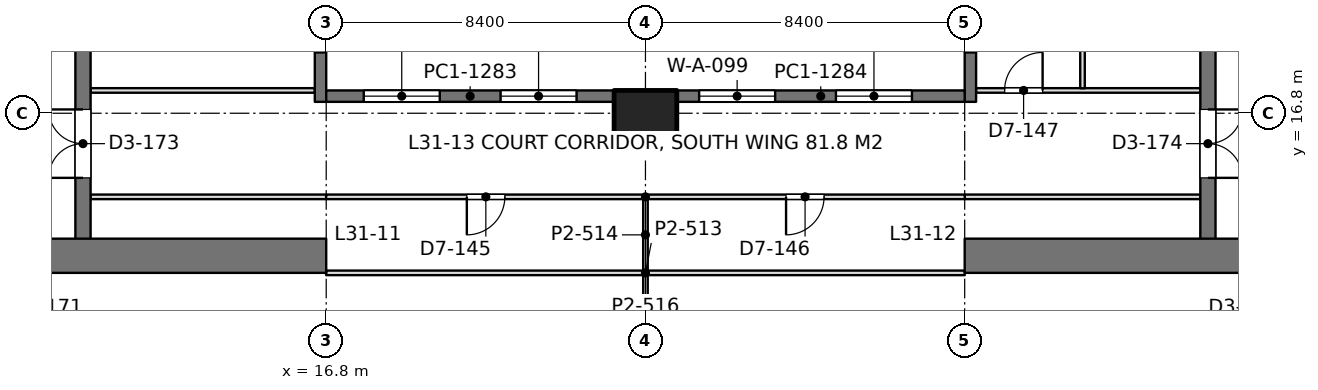
"""IFC4 building model, lengths in metres.
Left out: names, types, materials, properties, quantities, classifications, styles, units other than length and angle.
Written with IfcOpenShell. Run it as: python <this file> out.ifc"""

import sys

from ifc_helpers import new_model, si_unit, direction, frame, frame_2d, origin, origin_2d, place, context, subcontext, project, spatial, rectangle, extrude, element, fill, save


model = new_model("IFC4")
c1 = context("Model", 3, precision=1e-05, world=origin(), true_north=direction((0.0, 1.0)))
c2 = subcontext(c1, "Body", "Model", "MODEL_VIEW")
j1 = project(units=[si_unit("LENGTHUNIT", "METRE"), si_unit("PLANEANGLEUNIT", "RADIAN")], contexts=[c1])
p1 = place(None, origin())
s1 = spatial("IfcSite", under=j1, at=p1, CompositionType="ELEMENT")
p2 = place(p1, origin())
s2 = spatial("IfcBuilding", under=s1, at=p2, CompositionType="ELEMENT")
p3 = place(p2, frame((0.0, 0.0, 138.6)))
s3 = spatial("IfcBuildingStorey", under=s2, at=p3, CompositionType="ELEMENT", Elevation=138.6)
p4 = place(p3, frame((25.2, 16.8, 0.0), z_axis=(0.0, 0.0, 1.0), x_axis=(1.0, 0.0, 0.0)))
e1 = element("IfcColumn", 1, at=p4, inside=s3, PredefinedType="COLUMN", context=c2, shape_type="SweptSolid", body=[
    extrude(rectangle(XDim=1.65, YDim=1.2, at=origin_2d()), origin(), (0.0, 0.0, 1.0), 4.2),
])
p5 = place(p3, frame((-1.2, 13.05, 0.0), z_axis=(0.0, 0.0, 1.0), x_axis=(1.0, 0.0, 0.0)))
e2 = element("IfcWall", 2, at=p5, inside=s3, PredefinedType="SHEAR", context=c2, shape_type="SweptSolid", body=[
    extrude(rectangle(XDim=18.0, YDim=0.9, at=frame_2d((9.0, 0.0))), origin(), (0.0, 0.0, 1.0), 4.2),
])
p6 = place(p5, frame((8.95, 0.0, 0.0)))
e3 = element("IfcOpeningElement", 3, at=p6, cuts=e2, PredefinedType="OPENING", context=c2, shape_type="SweptSolid", body=[
    extrude(rectangle(XDim=1.8, YDim=2.4, at=frame_2d((0.9, 1.2))), frame((0.0, 0.46, 0.0), z_axis=(0.0, -1.0, 0.0), x_axis=(1.0, 0.0, 0.0)), (0.0, 0.0, 1.0), 0.92),
])
p7 = place(p3, frame((10.4, 13.05, 0.0), z_axis=(0.0, 0.0, 1.0), x_axis=(0.0, 1.0, 0.0)))
e4 = element("IfcWall", 4, at=p7, inside=s3, PredefinedType="SHEAR", context=c2, shape_type="SweptSolid", body=[
    extrude(rectangle(XDim=24.3, YDim=0.4, at=frame_2d((12.15, 0.0))), origin(), (0.0, 0.0, 1.0), 4.2),
])
p8 = place(p7, frame((10.05, 0.0, 0.0)))
e5 = element("IfcOpeningElement", 5, at=p8, cuts=e4, PredefinedType="OPENING", context=c2, shape_type="SweptSolid", body=[
    extrude(rectangle(XDim=1.1, YDim=2.2, at=frame_2d((0.55, 1.1))), frame((0.0, 0.21, 0.0), z_axis=(0.0, -1.0, 0.0), x_axis=(1.0, 0.0, 0.0)), (0.0, 0.0, 1.0), 0.42),
])
p9 = place(p7, frame((12.9, 0.0, 0.0)))
e6 = element("IfcOpeningElement", 6, at=p9, cuts=e4, PredefinedType="OPENING", context=c2, shape_type="SweptSolid", body=[
    extrude(rectangle(XDim=1.1, YDim=2.2, at=frame_2d((0.55, 1.1))), frame((0.0, 0.21, 0.0), z_axis=(0.0, -1.0, 0.0), x_axis=(1.0, 0.0, 0.0)), (0.0, 0.0, 1.0), 0.42),
])
p10 = place(p7, frame((21.45, 0.0, 0.0)))
e7 = element("IfcOpeningElement", 7, at=p10, cuts=e4, PredefinedType="OPENING", context=c2, shape_type="SweptSolid", body=[
    extrude(rectangle(XDim=1.1, YDim=2.2, at=frame_2d((0.55, 1.1))), frame((0.0, 0.21, 0.0), z_axis=(0.0, -1.0, 0.0), x_axis=(1.0, 0.0, 0.0)), (0.0, 0.0, 1.0), 0.42),
])
p11 = place(p7, frame((2.05, 0.0, 0.0)))
e8 = element("IfcOpeningElement", 8, at=p11, cuts=e4, PredefinedType="OPENING", context=c2, shape_type="SweptSolid", body=[
    extrude(rectangle(XDim=1.8, YDim=2.4, at=frame_2d((0.9, 1.2))), frame((0.0, 0.21, 0.0), z_axis=(0.0, -1.0, 0.0), x_axis=(1.0, 0.0, 0.0)), (0.0, 0.0, 1.0), 0.42),
])
p12 = place(p7, frame((5.8, 0.0, 0.0)))
e9 = element("IfcOpeningElement", 9, at=p12, cuts=e4, PredefinedType="OPENING", context=c2, shape_type="SweptSolid", body=[
    extrude(rectangle(XDim=1.8, YDim=2.4, at=frame_2d((0.9, 1.2))), frame((0.0, 0.21, 0.0), z_axis=(0.0, -1.0, 0.0), x_axis=(1.0, 0.0, 0.0)), (0.0, 0.0, 1.0), 0.42),
])
p13 = place(p3, frame((33.6, 13.05, 0.0), z_axis=(0.0, 0.0, 1.0), x_axis=(1.0, 0.0, 0.0)))
e10 = element("IfcWall", 10, at=p13, inside=s3, PredefinedType="SHEAR", context=c2, shape_type="SweptSolid", body=[
    extrude(rectangle(XDim=18.0, YDim=0.9, at=frame_2d((9.0, 0.0))), origin(), (0.0, 0.0, 1.0), 4.2),
])
p14 = place(p13, frame((7.25, 0.0, 0.0)))
e11 = element("IfcOpeningElement", 11, at=p14, cuts=e10, PredefinedType="OPENING", context=c2, shape_type="SweptSolid", body=[
    extrude(rectangle(XDim=1.8, YDim=2.4, at=frame_2d((0.9, 1.2))), frame((0.0, 0.46, 0.0), z_axis=(0.0, -1.0, 0.0), x_axis=(1.0, 0.0, 0.0)), (0.0, 0.0, 1.0), 0.92),
])
p15 = place(p3, frame((40.0, 13.05, 0.0), z_axis=(0.0, 0.0, 1.0), x_axis=(0.0, 1.0, 0.0)))
e12 = element("IfcWall", 12, at=p15, inside=s3, PredefinedType="SHEAR", context=c2, shape_type="SweptSolid", body=[
    extrude(rectangle(XDim=24.3, YDim=0.4, at=frame_2d((12.15, 0.0))), origin(), (0.0, 0.0, 1.0), 4.2),
])
p16 = place(p15, frame((10.05, 0.0, 0.0)))
e13 = element("IfcOpeningElement", 13, at=p16, cuts=e12, PredefinedType="OPENING", context=c2, shape_type="SweptSolid", body=[
    extrude(rectangle(XDim=1.1, YDim=2.2, at=frame_2d((0.55, 1.1))), frame((0.0, 0.21, 0.0), z_axis=(0.0, -1.0, 0.0), x_axis=(1.0, 0.0, 0.0)), (0.0, 0.0, 1.0), 0.42),
])
p17 = place(p15, frame((12.9, 0.0, 0.0)))
e14 = element("IfcOpeningElement", 14, at=p17, cuts=e12, PredefinedType="OPENING", context=c2, shape_type="SweptSolid", body=[
    extrude(rectangle(XDim=1.1, YDim=2.2, at=frame_2d((0.55, 1.1))), frame((0.0, 0.21, 0.0), z_axis=(0.0, -1.0, 0.0), x_axis=(1.0, 0.0, 0.0)), (0.0, 0.0, 1.0), 0.42),
])
p18 = place(p15, frame((21.45, 0.0, 0.0)))
e15 = element("IfcOpeningElement", 15, at=p18, cuts=e12, PredefinedType="OPENING", context=c2, shape_type="SweptSolid", body=[
    extrude(rectangle(XDim=1.1, YDim=2.2, at=frame_2d((0.55, 1.1))), frame((0.0, 0.21, 0.0), z_axis=(0.0, -1.0, 0.0), x_axis=(1.0, 0.0, 0.0)), (0.0, 0.0, 1.0), 0.42),
])
p19 = place(p15, frame((2.05, 0.0, 0.0)))
e16 = element("IfcOpeningElement", 16, at=p19, cuts=e12, PredefinedType="OPENING", context=c2, shape_type="SweptSolid", body=[
    extrude(rectangle(XDim=1.8, YDim=2.4, at=frame_2d((0.9, 1.2))), frame((0.0, 0.21, 0.0), z_axis=(0.0, -1.0, 0.0), x_axis=(1.0, 0.0, 0.0)), (0.0, 0.0, 1.0), 0.42),
])
p20 = place(p15, frame((5.8, 0.0, 0.0)))
e17 = element("IfcOpeningElement", 17, at=p20, cuts=e12, PredefinedType="OPENING", context=c2, shape_type="SweptSolid", body=[
    extrude(rectangle(XDim=1.8, YDim=2.4, at=frame_2d((0.9, 1.2))), frame((0.0, 0.21, 0.0), z_axis=(0.0, -1.0, 0.0), x_axis=(1.0, 0.0, 0.0)), (0.0, 0.0, 1.0), 0.42),
])
p21 = place(p3, frame((16.65, 17.1, 0.0), z_axis=(0.0, 0.0, 1.0), x_axis=(0.0, 1.0, 0.0)))
e18 = element("IfcWall", 18, at=p21, inside=s3, PredefinedType="SOLIDWALL", context=c2, shape_type="SweptSolid", body=[
    extrude(rectangle(XDim=5.0, YDim=0.3, at=frame_2d((2.5, 0.0))), origin(), (0.0, 0.0, 1.0), 4.05),
])
p22 = place(p21, frame((1.3, 0.0, 0.1)))
e19 = element("IfcOpeningElement", 19, at=p22, cuts=e18, PredefinedType="OPENING", context=c2, shape_type="SweptSolid", body=[
    extrude(rectangle(XDim=2.0, YDim=3.0, at=frame_2d((1.0, 1.5))), frame((0.0, 0.16, 0.0), z_axis=(0.0, -1.0, 0.0), x_axis=(1.0, 0.0, 0.0)), (0.0, 0.0, 1.0), 0.32),
])
p23 = place(p3, frame((33.75, 17.1, 0.0), z_axis=(0.0, 0.0, 1.0), x_axis=(0.0, 1.0, 0.0)))
e20 = element("IfcWall", 20, at=p23, inside=s3, PredefinedType="SOLIDWALL", context=c2, shape_type="SweptSolid", body=[
    extrude(rectangle(XDim=5.0, YDim=0.3, at=frame_2d((2.5, 0.0))), origin(), (0.0, 0.0, 1.0), 4.05),
])
p24 = place(p23, frame((1.3, 0.0, 0.1)))
e21 = element("IfcOpeningElement", 21, at=p24, cuts=e20, PredefinedType="OPENING", context=c2, shape_type="SweptSolid", body=[
    extrude(rectangle(XDim=2.0, YDim=3.0, at=frame_2d((1.0, 1.5))), frame((0.0, 0.16, 0.0), z_axis=(0.0, -1.0, 0.0), x_axis=(1.0, 0.0, 0.0)), (0.0, 0.0, 1.0), 0.32),
])
p25 = place(p3, frame((16.8, 17.25, 0.0), z_axis=(0.0, 0.0, 1.0), x_axis=(1.0, 0.0, 0.0)))
e22 = element("IfcWall", 22, at=p25, inside=s3, PredefinedType="SOLIDWALL", context=c2, shape_type="SweptSolid", body=[
    extrude(rectangle(XDim=7.575, YDim=0.3, at=frame_2d((3.788, 0.0))), origin(), (0.0, 0.0, 1.0), 4.05),
])
p26 = place(p25, frame((0.988, 0.0, 0.1)))
e23 = element("IfcOpeningElement", 23, at=p26, cuts=e22, PredefinedType="OPENING", context=c2, shape_type="SweptSolid", body=[
    extrude(rectangle(XDim=2.0, YDim=3.0, at=frame_2d((1.0, 1.5))), frame((0.0, 0.16, 0.0), z_axis=(0.0, -1.0, 0.0), x_axis=(1.0, 0.0, 0.0)), (0.0, 0.0, 1.0), 0.32),
])
p27 = place(p25, frame((4.587, 0.0, 0.1)))
e24 = element("IfcOpeningElement", 24, at=p27, cuts=e22, PredefinedType="OPENING", context=c2, shape_type="SweptSolid", body=[
    extrude(rectangle(XDim=2.0, YDim=3.0, at=frame_2d((1.0, 1.5))), frame((0.0, 0.16, 0.0), z_axis=(0.0, -1.0, 0.0), x_axis=(1.0, 0.0, 0.0)), (0.0, 0.0, 1.0), 0.32),
])
p28 = place(p3, frame((26.025, 17.25, 0.0), z_axis=(0.0, 0.0, 1.0), x_axis=(1.0, 0.0, 0.0)))
e25 = element("IfcWall", 25, at=p28, inside=s3, PredefinedType="SOLIDWALL", context=c2, shape_type="SweptSolid", body=[
    extrude(rectangle(XDim=7.575, YDim=0.3, at=frame_2d((3.788, 0.0))), origin(), (0.0, 0.0, 1.0), 4.05),
])
p29 = place(p28, frame((0.587, 0.0, 0.1)))
e26 = element("IfcOpeningElement", 26, at=p29, cuts=e25, PredefinedType="OPENING", context=c2, shape_type="SweptSolid", body=[
    extrude(rectangle(XDim=2.0, YDim=3.0, at=frame_2d((1.0, 1.5))), frame((0.0, 0.16, 0.0), z_axis=(0.0, -1.0, 0.0), x_axis=(1.0, 0.0, 0.0)), (0.0, 0.0, 1.0), 0.32),
])
p30 = place(p28, frame((4.188, 0.0, 0.1)))
e27 = element("IfcOpeningElement", 27, at=p30, cuts=e25, PredefinedType="OPENING", context=c2, shape_type="SweptSolid", body=[
    extrude(rectangle(XDim=2.0, YDim=3.0, at=frame_2d((1.0, 1.5))), frame((0.0, 0.16, 0.0), z_axis=(0.0, -1.0, 0.0), x_axis=(1.0, 0.0, 0.0)), (0.0, 0.0, 1.0), 0.32),
])
p31 = place(p3, frame((10.598, 17.4, 0.0), z_axis=(0.0, 0.0, 1.0), x_axis=(1.0, 0.0, 0.0)))
e28 = element("IfcWall", 28, at=p31, inside=s3, PredefinedType="PARTITIONING", context=c2, shape_type="SweptSolid", body=[
    extrude(rectangle(XDim=5.904, YDim=0.12, at=frame_2d((2.952, 0.0))), origin(), (0.0, 0.0, 1.0), 3.55),
])
p32 = place(p3, frame((33.898, 17.4, 0.0), z_axis=(0.0, 0.0, 1.0), x_axis=(1.0, 0.0, 0.0)))
e29 = element("IfcWall", 29, at=p32, inside=s3, PredefinedType="PARTITIONING", context=c2, shape_type="SweptSolid", body=[
    extrude(rectangle(XDim=5.904, YDim=0.12, at=frame_2d((2.952, 0.0))), origin(), (0.0, 0.0, 1.0), 3.55),
])
p33 = place(p32, frame((0.752, 0.0, 0.0)))
e30 = element("IfcOpeningElement", 30, at=p33, cuts=e29, PredefinedType="OPENING", context=c2, shape_type="SweptSolid", body=[
    extrude(rectangle(XDim=1.0, YDim=2.4, at=frame_2d((0.5, 1.2))), frame((0.0, 0.07, 0.0), z_axis=(0.0, -1.0, 0.0), x_axis=(1.0, 0.0, 0.0)), (0.0, 0.0, 1.0), 0.14),
])
p34 = place(p3, frame((36.7, 17.458, 0.0), z_axis=(0.0, 0.0, 1.0), x_axis=(0.0, 1.0, 0.0)))
e31 = element("IfcWall", 31, at=p34, inside=s3, PredefinedType="PARTITIONING", context=c2, shape_type="SweptSolid", body=[
    extrude(rectangle(XDim=4.644, YDim=0.12, at=frame_2d((2.322, 0.0))), origin(), (0.0, 0.0, 1.0), 3.6),
])
p35 = place(p3, frame((25.2, 9.099, 0.0), z_axis=(0.0, 0.0, 1.0), x_axis=(0.0, 1.0, 0.0)))
e32 = element("IfcWall", 32, at=p35, inside=s3, PredefinedType="PARTITIONING", context=c2, shape_type="SweptSolid", body=[
    extrude(rectangle(XDim=3.443, YDim=0.12, at=frame_2d((1.721, 0.0))), origin(), (0.0, 0.0, 1.0), 3.55),
])
for number, where, z_axis, x_axis in (
    (33, (10.598, 14.6, 0.0), (0.0, 0.0, 1.0), (1.0, 0.0, 0.0)),
    (34, (33.598, 14.6, 0.0), (0.0, 0.0, 1.0), (1.0, 0.0, 0.0)),
):
    element("IfcWall", number, at=place(p3, frame(where, z_axis=z_axis, x_axis=x_axis)), inside=s3, PredefinedType="PARTITIONING", context=c2, shape_type="SweptSolid", body=[
        extrude(rectangle(XDim=6.204, YDim=0.12, at=frame_2d((3.102, 0.0))), origin(), (0.0, 0.0, 1.0), 3.55),
    ])
p36 = place(p3, frame((25.2, 12.658, 0.0), z_axis=(0.0, 0.0, 1.0), x_axis=(0.0, 1.0, 0.0)))
e35 = element("IfcWall", 35, at=p36, inside=s3, PredefinedType="PARTITIONING", context=c2, shape_type="SweptSolid", body=[
    extrude(rectangle(XDim=1.884, YDim=0.12, at=frame_2d((0.942, 0.0))), origin(), (0.0, 0.0, 1.0), 3.55),
])
p37 = place(p3, frame((16.798, 14.6, 0.0), z_axis=(0.0, 0.0, 1.0), x_axis=(1.0, 0.0, 0.0)))
e36 = element("IfcWall", 36, at=p37, inside=s3, PredefinedType="PARTITIONING", context=c2, shape_type="SweptSolid", body=[
    extrude(rectangle(XDim=16.804, YDim=0.12, at=frame_2d((8.402, 0.0))), origin(), (0.0, 0.0, 1.0), 3.55),
])
p38 = place(p37, frame((3.702, 0.0, 0.0)))
e37 = element("IfcOpeningElement", 37, at=p38, cuts=e36, PredefinedType="OPENING", context=c2, shape_type="SweptSolid", body=[
    extrude(rectangle(XDim=1.0, YDim=2.4, at=frame_2d((0.5, 1.2))), frame((0.0, 0.07, 0.0), z_axis=(0.0, -1.0, 0.0), x_axis=(1.0, 0.0, 0.0)), (0.0, 0.0, 1.0), 0.14),
])
p39 = place(p37, frame((12.102, 0.0, 0.0)))
e38 = element("IfcOpeningElement", 38, at=p39, cuts=e36, PredefinedType="OPENING", context=c2, shape_type="SweptSolid", body=[
    extrude(rectangle(XDim=1.0, YDim=2.4, at=frame_2d((0.5, 1.2))), frame((0.0, 0.07, 0.0), z_axis=(0.0, -1.0, 0.0), x_axis=(1.0, 0.0, 0.0)), (0.0, 0.0, 1.0), 0.14),
])
p40 = place(p3, frame((16.8, 12.6, 0.0), z_axis=(0.0, 0.0, 1.0), x_axis=(1.0, 0.0, 0.0)))
e39 = element("IfcWall", 39, at=p40, inside=s3, PredefinedType="PARTITIONING", context=c2, shape_type="SweptSolid", body=[
    extrude(rectangle(XDim=16.8, YDim=0.12, at=frame_2d((8.4, 0.0))), origin(), (0.0, 0.0, 1.0), 3.55),
])
p41 = place(p26, origin())
e40 = element("IfcWindow", 40, at=p41, inside=s3, PartitioningType="SINGLE_PANEL", PredefinedType="WINDOW", context=c2, shape_type="SweptSolid", body=[
    extrude(rectangle(XDim=2.0, YDim=3.0, at=frame_2d((1.0, 1.5))), frame((0.0, 0.03, 0.0), z_axis=(0.0, -1.0, 0.0), x_axis=(1.0, 0.0, 0.0)), (0.0, 0.0, 1.0), 0.06),
])
fill(e23, e40)
p42 = place(p27, origin())
e41 = element("IfcWindow", 41, at=p42, inside=s3, PartitioningType="SINGLE_PANEL", PredefinedType="WINDOW", context=c2, shape_type="SweptSolid", body=[
    extrude(rectangle(XDim=2.0, YDim=3.0, at=frame_2d((1.0, 1.5))), frame((0.0, 0.03, 0.0), z_axis=(0.0, -1.0, 0.0), x_axis=(1.0, 0.0, 0.0)), (0.0, 0.0, 1.0), 0.06),
])
fill(e24, e41)
p43 = place(p29, origin())
e42 = element("IfcWindow", 42, at=p43, inside=s3, PartitioningType="SINGLE_PANEL", PredefinedType="WINDOW", context=c2, shape_type="SweptSolid", body=[
    extrude(rectangle(XDim=2.0, YDim=3.0, at=frame_2d((1.0, 1.5))), frame((0.0, 0.03, 0.0), z_axis=(0.0, -1.0, 0.0), x_axis=(1.0, 0.0, 0.0)), (0.0, 0.0, 1.0), 0.06),
])
fill(e26, e42)
p44 = place(p30, origin())
e43 = element("IfcWindow", 43, at=p44, inside=s3, PartitioningType="SINGLE_PANEL", PredefinedType="WINDOW", context=c2, shape_type="SweptSolid", body=[
    extrude(rectangle(XDim=2.0, YDim=3.0, at=frame_2d((1.0, 1.5))), frame((0.0, 0.03, 0.0), z_axis=(0.0, -1.0, 0.0), x_axis=(1.0, 0.0, 0.0)), (0.0, 0.0, 1.0), 0.06),
])
fill(e27, e43)
p45 = place(p11, origin())
e44 = element("IfcDoor", 44, at=p45, inside=s3, OperationType="DOUBLE_DOOR_SINGLE_SWING", PredefinedType="DOOR", context=c2, shape_type="SweptSolid", body=[
    extrude(rectangle(XDim=1.8, YDim=2.4, at=frame_2d((0.9, 1.2))), frame((0.0, 0.025, 0.0), z_axis=(0.0, -1.0, 0.0), x_axis=(1.0, 0.0, 0.0)), (0.0, 0.0, 1.0), 0.05),
])
fill(e8, e44)
p46 = place(p19, frame((1.8, 0.0, 0.0), z_axis=(0.0, 0.0, 1.0), x_axis=(-1.0, 0.0, 0.0)))
e45 = element("IfcDoor", 45, at=p46, inside=s3, OperationType="DOUBLE_DOOR_SINGLE_SWING", PredefinedType="DOOR", context=c2, shape_type="SweptSolid", body=[
    extrude(rectangle(XDim=1.8, YDim=2.4, at=frame_2d((0.9, 1.2))), frame((0.0, 0.025, 0.0), z_axis=(0.0, -1.0, 0.0), x_axis=(1.0, 0.0, 0.0)), (0.0, 0.0, 1.0), 0.05),
])
fill(e16, e45)
p47 = place(p33, origin())
e46 = element("IfcDoor", 46, at=p47, inside=s3, OperationType="SINGLE_SWING_RIGHT", PredefinedType="DOOR", context=c2, shape_type="SweptSolid", body=[
    extrude(rectangle(XDim=1.0, YDim=2.4, at=frame_2d((0.5, 1.2))), frame((0.0, 0.025, 0.0), z_axis=(0.0, -1.0, 0.0), x_axis=(1.0, 0.0, 0.0)), (0.0, 0.0, 1.0), 0.05),
])
fill(e30, e46)
p48 = place(p38, frame((1.0, 0.0, 0.0), z_axis=(0.0, 0.0, 1.0), x_axis=(-1.0, 0.0, 0.0)))
e47 = element("IfcDoor", 47, at=p48, inside=s3, OperationType="SINGLE_SWING_RIGHT", PredefinedType="DOOR", context=c2, shape_type="SweptSolid", body=[
    extrude(rectangle(XDim=1.0, YDim=2.4, at=frame_2d((0.5, 1.2))), frame((0.0, 0.025, 0.0), z_axis=(0.0, -1.0, 0.0), x_axis=(1.0, 0.0, 0.0)), (0.0, 0.0, 1.0), 0.05),
])
fill(e37, e47)
p49 = place(p39, frame((1.0, 0.0, 0.0), z_axis=(0.0, 0.0, 1.0), x_axis=(-1.0, 0.0, 0.0)))
e48 = element("IfcDoor", 48, at=p49, inside=s3, OperationType="SINGLE_SWING_RIGHT", PredefinedType="DOOR", context=c2, shape_type="SweptSolid", body=[
    extrude(rectangle(XDim=1.0, YDim=2.4, at=frame_2d((0.5, 1.2))), frame((0.0, 0.025, 0.0), z_axis=(0.0, -1.0, 0.0), x_axis=(1.0, 0.0, 0.0)), (0.0, 0.0, 1.0), 0.05),
])
fill(e38, e48)
save(model, sys.argv[1])
